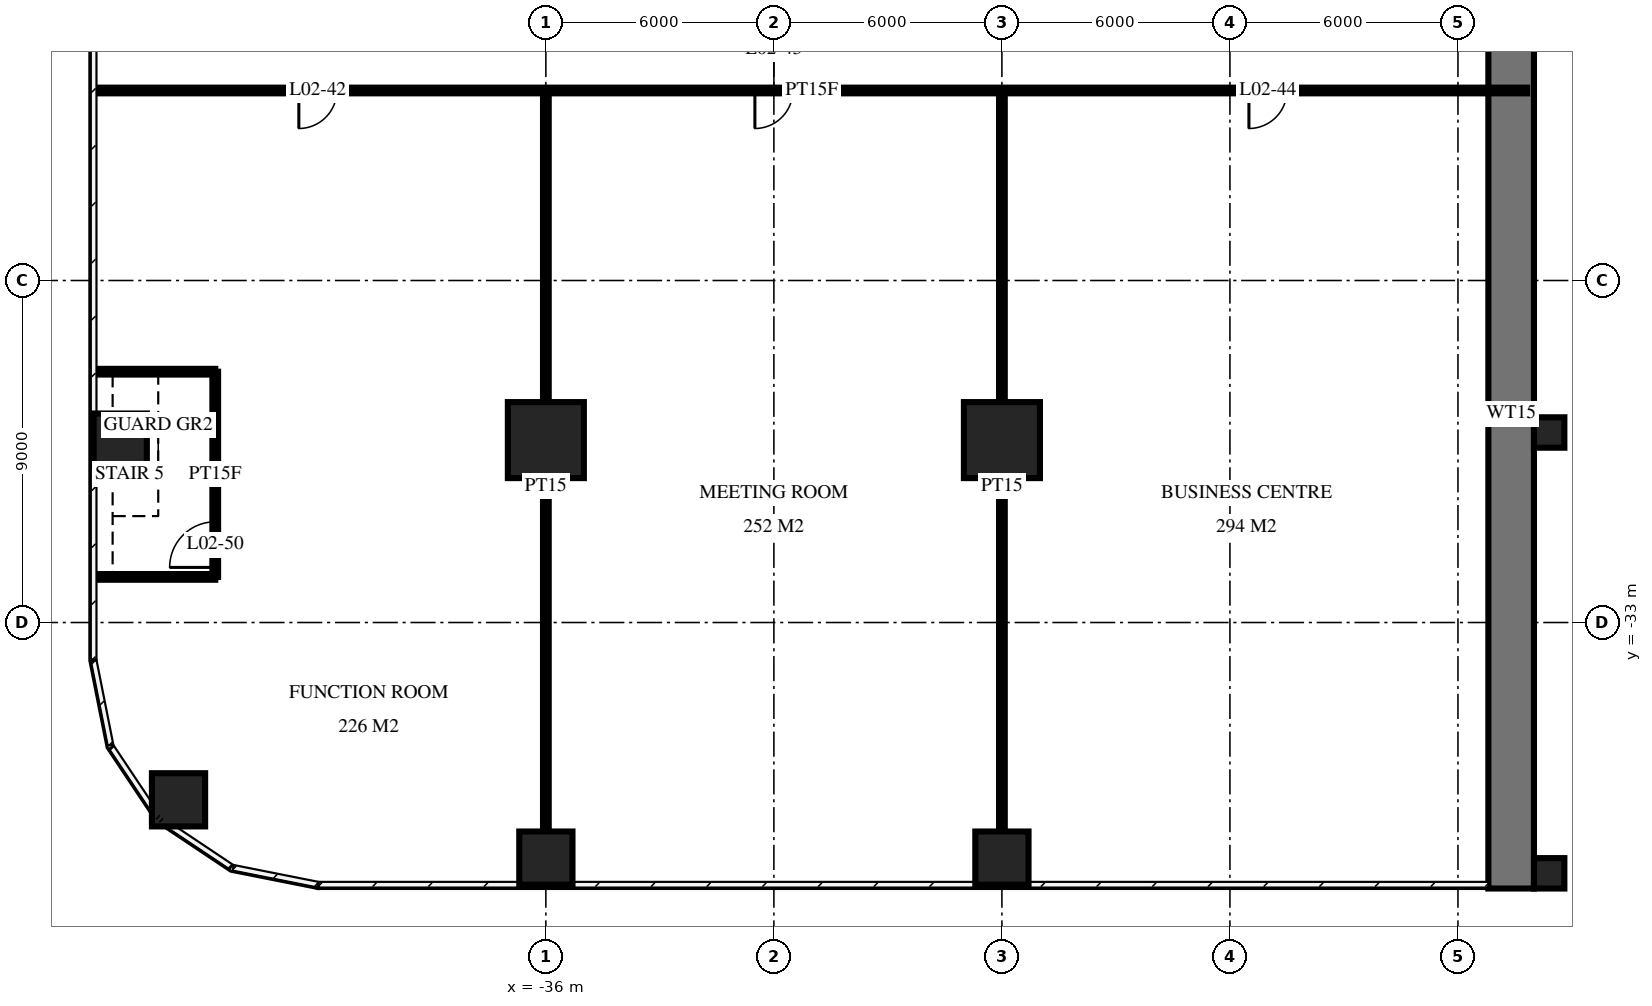
"""IFC4 building model, lengths in metres.
Left out: names, types, materials, properties, quantities, classifications, styles, units other than length and angle.
Written with IfcOpenShell. Run it as: python <this file> out.ifc"""

import sys

from ifc_helpers import new_model, si_unit, direction, frame, frame_2d, origin, origin_2d, place, context, subcontext, project, spatial, rectangle, circle, extrude, element, fill, save


model = new_model("IFC4")
c1 = context("Model", 3, precision=1e-05, world=origin(), true_north=direction((0.0, 1.0)))
c2 = subcontext(c1, "Body", "Model", "MODEL_VIEW")
j1 = project(units=[si_unit("LENGTHUNIT", "METRE"), si_unit("PLANEANGLEUNIT", "RADIAN")], contexts=[c1])
p1 = place(None, origin())
s1 = spatial("IfcSite", under=j1, at=p1, CompositionType="ELEMENT")
p2 = place(p1, origin())
s2 = spatial("IfcBuilding", under=s1, at=p2, CompositionType="ELEMENT")
p3 = place(p2, frame((0.0, 0.0, 12.5)))
s3 = spatial("IfcBuildingStorey", under=s2, at=p3, CompositionType="ELEMENT", Elevation=12.5)
for number, where, z_axis, x_axis in (
    (1, (-47.2, -28.2, 0.0), (0.0, 0.0, 1.0), (1.0, 0.0, 0.0)),
    (2, (-45.666, -37.666, 0.0), (0.0, 0.0, 1.0), (1.0, 0.0, 0.0)),
    (3, (-36.0, -39.2, 0.0), (0.0, 0.0, 1.0), (1.0, 0.0, 0.0)),
):
    element("IfcColumn", number, at=place(p3, frame(where, z_axis=z_axis, x_axis=x_axis)), inside=s3, PredefinedType="COLUMN", context=c2, shape_type="SweptSolid", body=[
        extrude(circle(Radius=0.7, at=origin_2d()), origin(), (0.0, 0.0, 1.0), 5.5),
    ])
p4 = place(p3, frame((-36.0, -28.2, 0.0), z_axis=(0.0, 0.0, 1.0), x_axis=(1.0, 0.0, 0.0)))
e4 = element("IfcColumn", 4, at=p4, inside=s3, PredefinedType="COLUMN", context=c2, shape_type="SweptSolid", body=[
    extrude(circle(Radius=1.0, at=origin_2d()), origin(), (0.0, 0.0, 1.0), 5.5),
])
p5 = place(p3, frame((-24.0, -39.2, 0.0), z_axis=(0.0, 0.0, 1.0), x_axis=(1.0, 0.0, 0.0)))
e5 = element("IfcColumn", 5, at=p5, inside=s3, PredefinedType="COLUMN", context=c2, shape_type="SweptSolid", body=[
    extrude(circle(Radius=0.7, at=origin_2d()), origin(), (0.0, 0.0, 1.0), 5.5),
])
p6 = place(p3, frame((-24.0, -28.2, 0.0), z_axis=(0.0, 0.0, 1.0), x_axis=(1.0, 0.0, 0.0)))
e6 = element("IfcColumn", 6, at=p6, inside=s3, PredefinedType="COLUMN", context=c2, shape_type="SweptSolid", body=[
    extrude(circle(Radius=1.0, at=origin_2d()), origin(), (0.0, 0.0, 1.0), 5.5),
])
p7 = place(p3, frame((-10.6, -40.0, 0.0), z_axis=(0.0, 0.0, 1.0), x_axis=(0.0, 1.0, 0.0)))
e7 = element("IfcWall", 7, at=p7, inside=s3, PredefinedType="SHEAR", context=c2, shape_type="SweptSolid", body=[
    extrude(rectangle(XDim=25.0, YDim=1.2, at=frame_2d((12.5, 0.0))), origin(), (0.0, 0.0, 1.0), 5.5),
])
for number, where, z_axis, x_axis in (
    (8, (-9.6, -39.6, 0.0), (0.0, 0.0, 1.0), (1.0, 0.0, 0.0)),
    (9, (-9.6, -28.0, 0.0), (0.0, 0.0, 1.0), (1.0, 0.0, 0.0)),
):
    element("IfcColumn", number, at=place(p3, frame(where, z_axis=z_axis, x_axis=x_axis)), inside=s3, PredefinedType="COLUMN", context=c2, shape_type="SweptSolid", body=[
        extrude(rectangle(XDim=0.8, YDim=0.8, at=origin_2d()), origin(), (0.0, 0.0, 1.0), 4.25),
    ])
for number, where, z_axis, x_axis in (
    (10, (-24.0, -39.82, 0.0), (0.0, 0.0, 1.0), (0.0, 1.0, 0.0)),
    (11, (-36.0, -39.82, 0.0), (0.0, 0.0, 1.0), (0.0, 1.0, 0.0)),
):
    element("IfcWall", number, at=place(p3, frame(where, z_axis=z_axis, x_axis=x_axis)), inside=s3, PredefinedType="PARTITIONING", context=c2, shape_type="SweptSolid", body=[
        extrude(rectangle(XDim=20.82, YDim=0.15, at=frame_2d((10.41, 0.0))), origin(), (0.0, 0.0, 1.0), 5.05),
    ])
p8 = place(p3, frame((-44.7, -31.8, 0.0), z_axis=(0.0, 0.0, 1.0), x_axis=(0.0, 1.0, 0.0)))
e12 = element("IfcWall", 12, at=p8, inside=s3, PredefinedType="PARTITIONING", context=c2, shape_type="SweptSolid", body=[
    extrude(rectangle(XDim=5.4, YDim=0.15, at=frame_2d((2.7, 0.0))), origin(), (0.0, 0.0, 1.0), 5.05),
])
p9 = place(p8, frame((0.25, 0.0, 0.0)))
e13 = element("IfcOpeningElement", 13, at=p9, cuts=e12, PredefinedType="OPENING", context=c2, shape_type="SweptSolid", body=[
    extrude(rectangle(XDim=1.2, YDim=2.1, at=frame_2d((0.6, 1.05))), frame((0.0, 0.085, 0.0), z_axis=(0.0, -1.0, 0.0), x_axis=(1.0, 0.0, 0.0)), (0.0, 0.0, 1.0), 0.17),
])
for number, where, z_axis, x_axis in (
    (14, (-47.82, -31.8, 0.0), (0.0, 0.0, 1.0), (1.0, 0.0, 0.0)),
    (15, (-47.82, -26.4, 0.0), (0.0, 0.0, 1.0), (1.0, 0.0, 0.0)),
):
    element("IfcWall", number, at=place(p3, frame(where, z_axis=z_axis, x_axis=x_axis)), inside=s3, PredefinedType="PARTITIONING", context=c2, shape_type="SweptSolid", body=[
        extrude(rectangle(XDim=3.12, YDim=0.15, at=frame_2d((1.56, 0.0))), origin(), (0.0, 0.0, 1.0), 5.05),
    ])
p10 = place(p3, frame((-47.82, -19.0, 0.0), z_axis=(0.0, 0.0, 1.0), x_axis=(1.0, 0.0, 0.0)))
e16 = element("IfcWall", 16, at=p10, inside=s3, PredefinedType="PARTITIONING", context=c2, shape_type="SweptSolid", body=[
    extrude(rectangle(XDim=37.64, YDim=0.15, at=frame_2d((18.82, 0.0))), origin(), (0.0, 0.0, 1.0), 5.05),
])
p11 = place(p10, frame((5.32, 0.0, 0.0)))
e17 = element("IfcOpeningElement", 17, at=p11, cuts=e16, PredefinedType="OPENING", context=c2, shape_type="SweptSolid", body=[
    extrude(rectangle(XDim=1.0, YDim=2.1, at=frame_2d((0.5, 1.05))), frame((0.0, 0.085, 0.0), z_axis=(0.0, -1.0, 0.0), x_axis=(1.0, 0.0, 0.0)), (0.0, 0.0, 1.0), 0.17),
])
p12 = place(p10, frame((17.32, 0.0, 0.0)))
e18 = element("IfcOpeningElement", 18, at=p12, cuts=e16, PredefinedType="OPENING", context=c2, shape_type="SweptSolid", body=[
    extrude(rectangle(XDim=1.0, YDim=2.1, at=frame_2d((0.5, 1.05))), frame((0.0, 0.085, 0.0), z_axis=(0.0, -1.0, 0.0), x_axis=(1.0, 0.0, 0.0)), (0.0, 0.0, 1.0), 0.17),
])
p13 = place(p10, frame((30.32, 0.0, 0.0)))
e19 = element("IfcOpeningElement", 19, at=p13, cuts=e16, PredefinedType="OPENING", context=c2, shape_type="SweptSolid", body=[
    extrude(rectangle(XDim=1.0, YDim=2.1, at=frame_2d((0.5, 1.05))), frame((0.0, 0.085, 0.0), z_axis=(0.0, -1.0, 0.0), x_axis=(1.0, 0.0, 0.0)), (0.0, 0.0, 1.0), 0.17),
])
p14 = place(p11, frame((0.5, 0.0, 0.0), z_axis=(0.0, 0.0, 1.0), x_axis=(-1.0, 0.0, 0.0)))
e20 = element("IfcDoor", 20, at=p14, inside=s3, OperationType="SINGLE_SWING_LEFT", PredefinedType="DOOR", context=c2, shape_type="SweptSolid", body=[
    extrude(rectangle(XDim=1.0, YDim=2.1, at=frame_2d((0.0, 1.05))), frame((0.0, -0.025, 0.0), z_axis=(0.0, 1.0, 0.0), x_axis=(-1.0, 0.0, 0.0)), (0.0, 0.0, 1.0), 0.05),
])
fill(e17, e20)
p15 = place(p12, frame((0.5, 0.0, 0.0), z_axis=(0.0, 0.0, 1.0), x_axis=(-1.0, 0.0, 0.0)))
e21 = element("IfcDoor", 21, at=p15, inside=s3, OperationType="SINGLE_SWING_LEFT", PredefinedType="DOOR", context=c2, shape_type="SweptSolid", body=[
    extrude(rectangle(XDim=1.0, YDim=2.1, at=frame_2d((0.0, 1.05))), frame((0.0, -0.025, 0.0), z_axis=(0.0, 1.0, 0.0), x_axis=(-1.0, 0.0, 0.0)), (0.0, 0.0, 1.0), 0.05),
])
fill(e18, e21)
p16 = place(p13, frame((0.5, 0.0, 0.0), z_axis=(0.0, 0.0, 1.0), x_axis=(-1.0, 0.0, 0.0)))
e22 = element("IfcDoor", 22, at=p16, inside=s3, OperationType="SINGLE_SWING_LEFT", PredefinedType="DOOR", context=c2, shape_type="SweptSolid", body=[
    extrude(rectangle(XDim=1.0, YDim=2.1, at=frame_2d((0.0, 1.05))), frame((0.0, -0.025, 0.0), z_axis=(0.0, 1.0, 0.0), x_axis=(-1.0, 0.0, 0.0)), (0.0, 0.0, 1.0), 0.05),
])
fill(e19, e22)
p17 = place(p9, origin())
e23 = element("IfcDoor", 23, at=p17, inside=s3, OperationType="SINGLE_SWING_RIGHT", PredefinedType="DOOR", context=c2, shape_type="SweptSolid", body=[
    extrude(rectangle(XDim=1.2, YDim=2.1, at=frame_2d((0.6, 1.05))), frame((0.0, 0.025, 0.0), z_axis=(0.0, -1.0, 0.0), x_axis=(1.0, 0.0, 0.0)), (0.0, 0.0, 1.0), 0.05),
])
fill(e13, e23)
save(model, sys.argv[1])
